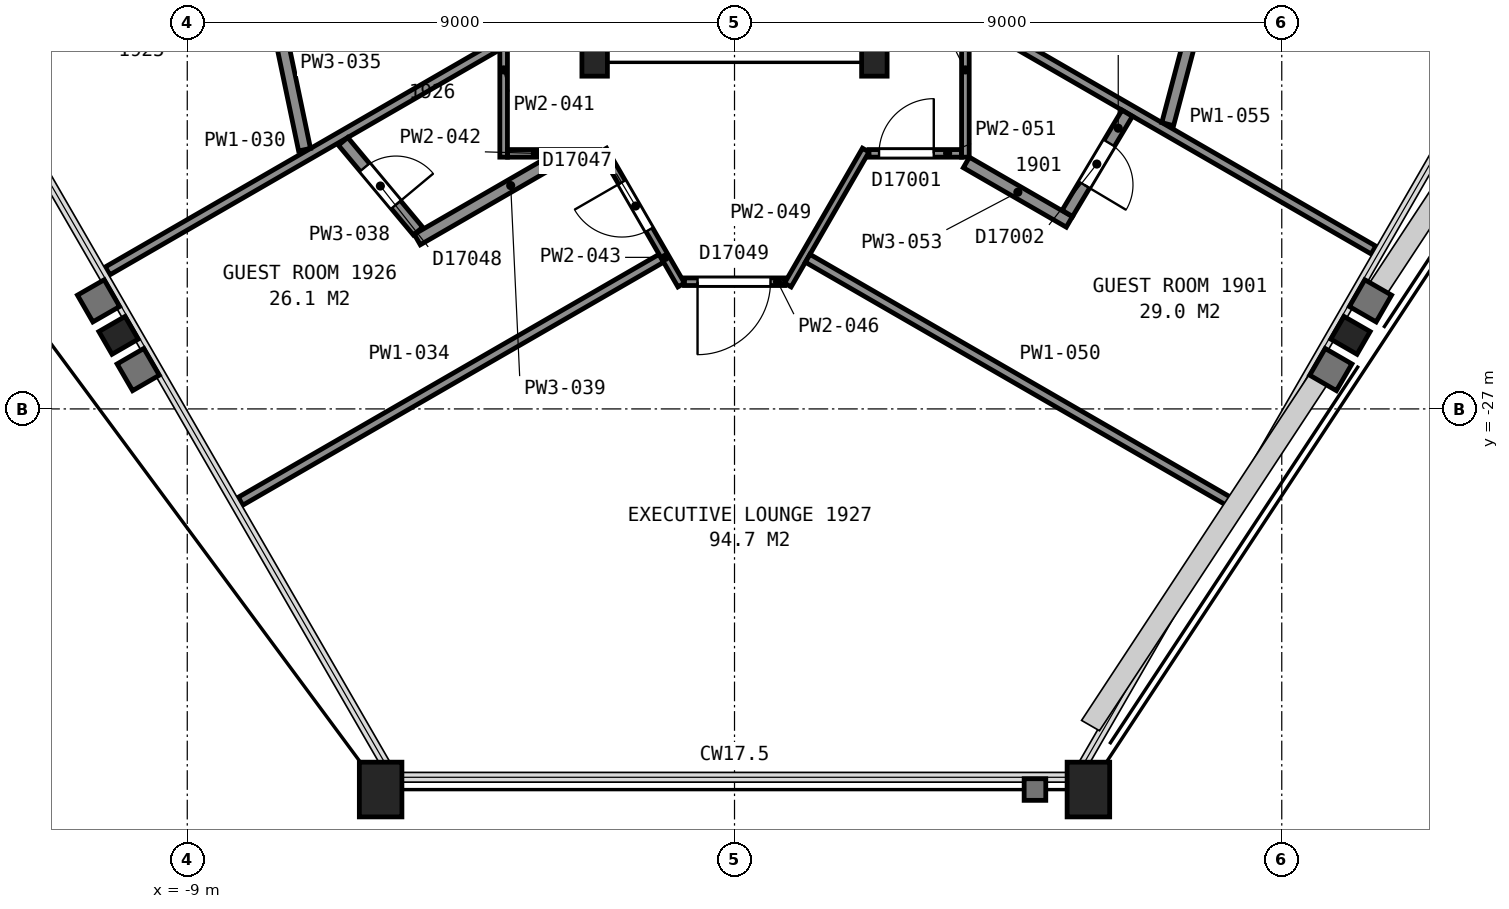
"""IFC4 building model, lengths in metres.
Left out: names, types, materials, properties, quantities, classifications, styles, units other than length and angle.
Written with IfcOpenShell. Run it as: python <this file> out.ifc"""

import sys

from ifc_helpers import new_model, si_unit, direction, frame, frame_2d, origin, origin_2d, place, context, subcontext, project, spatial, rectangle, hollow_rectangle, i_section, extrude, element, fill, save


model = new_model("IFC4")
c1 = context("Model", 3, precision=1e-05, world=origin(), true_north=direction((0.0, 1.0)))
c2 = subcontext(c1, "Body", "Model", "MODEL_VIEW")
j1 = project(units=[si_unit("LENGTHUNIT", "METRE"), si_unit("PLANEANGLEUNIT", "RADIAN")], contexts=[c1])
p1 = place(None, origin())
s1 = spatial("IfcSite", under=j1, at=p1, CompositionType="ELEMENT")
p2 = place(p1, origin())
s2 = spatial("IfcBuilding", under=s1, at=p2, CompositionType="ELEMENT")
p3 = place(p2, frame((0.0, 0.0, 83.6)))
s3 = spatial("IfcBuildingStorey", under=s2, at=p3, CompositionType="ELEMENT", Elevation=83.6)
p4 = place(p3, frame((-10.13, -25.79, 0.0), z_axis=(0.0, 0.0, 1.0), x_axis=(-0.5, 0.866025403784, 0.0)))
e1 = element("IfcColumn", 1, at=p4, inside=s3, PredefinedType="COLUMN", context=c2, shape_type="SweptSolid", body=[
    extrude(i_section(OverallWidth=0.432, OverallDepth=0.498, WebThickness=0.056, FlangeThickness=0.089, FilletRadius=0.015, at=origin_2d()), origin(), (0.0, 0.0, 1.0), 2.87),
])
for number, where, z_axis, x_axis in (
    (2, (-5.82, -33.26, 0.0), (0.0, 0.0, 1.0), (-1.0, 0.0, 0.0)),
    (3, (5.82, -33.26, 0.0), (0.0, 0.0, 1.0), (-1.0, 0.0, 0.0)),
):
    element("IfcColumn", number, at=place(p3, frame(where, z_axis=z_axis, x_axis=x_axis)), inside=s3, PredefinedType="COLUMN", context=c2, shape_type="SweptSolid", body=[
        extrude(hollow_rectangle(XDim=0.7, YDim=0.9, WallThickness=0.065, at=origin_2d()), origin(), (0.0, 0.0, 1.0), 3.6),
    ])
p5 = place(p3, frame((10.13, -25.79, 0.0), z_axis=(0.0, 0.0, 1.0), x_axis=(-0.5, -0.866025403784, 0.0)))
e4 = element("IfcColumn", 4, at=p5, inside=s3, PredefinedType="COLUMN", context=c2, shape_type="SweptSolid", body=[
    extrude(i_section(OverallWidth=0.432, OverallDepth=0.498, WebThickness=0.056, FlangeThickness=0.089, FilletRadius=0.015, at=origin_2d()), origin(), (0.0, 0.0, 1.0), 2.87),
])
for number, where, z_axis, x_axis in (
    (5, (-2.3, -21.3, 0.0), (0.0, 0.0, 1.0), (-1.0, 0.0, 0.0)),
    (6, (2.3, -21.3, 0.0), (0.0, 0.0, 1.0), (-1.0, 0.0, 0.0)),
):
    element("IfcColumn", number, at=place(p3, frame(where, z_axis=z_axis, x_axis=x_axis)), inside=s3, PredefinedType="COLUMN", context=c2, shape_type="SweptSolid", body=[
        extrude(i_section(OverallWidth=0.419, OverallDepth=0.455, WebThickness=0.042, FlangeThickness=0.068, FilletRadius=0.015, at=origin_2d()), origin(), (0.0, 0.0, 1.0), 3.6),
    ])
p6 = place(p3, frame((-10.311, -24.73, 0.0), z_axis=(0.0, 0.0, 1.0), x_axis=(0.8660132178, 0.500021106151, 0.0)))
e7 = element("IfcWall", 7, at=p6, inside=s3, PredefinedType="PARTITIONING", context=c2, shape_type="SweptSolid", body=[
    extrude(rectangle(XDim=7.406, YDim=0.15, at=frame_2d((3.703, 0.0))), origin(), (0.0, 0.0, 1.0), 2.262),
])
p7 = place(p3, frame((-8.124, -28.518, 0.0), z_axis=(0.0, 0.0, 1.0), x_axis=(0.866021771655, 0.500006290979, 0.0)))
e8 = element("IfcWall", 8, at=p7, inside=s3, PredefinedType="PARTITIONING", context=c2, shape_type="SweptSolid", body=[
    extrude(rectangle(XDim=7.992, YDim=0.15, at=frame_2d((3.996, 0.0))), origin(), (0.0, 0.0, 1.0), 2.262),
])
p8 = place(p3, frame((-7.668, -19.877, 0.0), z_axis=(0.0, 0.0, 1.0), x_axis=(0.204611748063, -0.978843211426, 0.0)))
e9 = element("IfcWall", 9, at=p8, inside=s3, PredefinedType="PARTITIONING", context=c2, shape_type="SweptSolid", body=[
    extrude(rectangle(XDim=2.921, YDim=0.2, at=frame_2d((1.46, 0.0))), origin(), (0.0, 0.0, 1.0), 2.262),
])
p9 = place(p3, frame((-6.437, -22.6, 0.0), z_axis=(0.0, 0.0, 1.0), x_axis=(0.640970893908, -0.76756518496, 0.0)))
e10 = element("IfcWall", 10, at=p9, inside=s3, PredefinedType="PARTITIONING", context=c2, shape_type="SweptSolid", body=[
    extrude(rectangle(XDim=1.923, YDim=0.2, at=frame_2d((0.961, 0.0))), origin(), (0.0, 0.0, 1.0), 2.262),
])
p10 = place(p9, frame((0.556, 0.0, 0.0)))
e11 = element("IfcOpeningElement", 11, at=p10, cuts=e10, PredefinedType="OPENING", context=c2, shape_type="SweptSolid", body=[
    extrude(rectangle(XDim=0.8, YDim=2.1, at=frame_2d((0.4, 1.05))), frame((0.0, 0.11, 0.0), z_axis=(0.0, -1.0, 0.0), x_axis=(1.0, 0.0, 0.0)), (0.0, 0.0, 1.0), 0.22),
])
p11 = place(p3, frame((-5.218, -24.214, 0.0), z_axis=(0.0, 0.0, 1.0), x_axis=(0.865922540442, 0.500178122226, 0.0)))
e12 = element("IfcWall", 12, at=p11, inside=s3, PredefinedType="PARTITIONING", context=c2, shape_type="SweptSolid", body=[
    extrude(rectangle(XDim=2.535, YDim=0.2, at=frame_2d((1.268, 0.0))), origin(), (0.0, 0.0, 1.0), 2.262),
])
p12 = place(p3, frame((-3.797, -22.86, 0.0), z_axis=(0.0, 0.0, 1.0), x_axis=(0.0, 1.0, 0.0)))
e13 = element("IfcWall", 13, at=p12, inside=s3, PredefinedType="PARTITIONING", context=c2, shape_type="SweptSolid", body=[
    extrude(rectangle(XDim=2.871, YDim=0.125, at=frame_2d((1.435, 0.0))), origin(), (0.0, 0.0, 1.0), 2.262),
])
p13 = place(p3, frame((-3.732, -22.797, 0.0), z_axis=(0.0, 0.0, 1.0), x_axis=(1.0, 0.0, 0.0)))
e14 = element("IfcWall", 14, at=p13, inside=s3, PredefinedType="PARTITIONING", context=c2, shape_type="SweptSolid", body=[
    extrude(rectangle(XDim=1.52, YDim=0.125, at=frame_2d((0.76, 0.0))), origin(), (0.0, 0.0, 1.0), 2.262),
])
p14 = place(p3, frame((-0.877, -24.962, 0.0), z_axis=(0.0, 0.0, 1.0), x_axis=(-0.500063308241, 0.865988849669, 0.0)))
e15 = element("IfcWall", 15, at=p14, inside=s3, PredefinedType="PARTITIONING", context=c2, shape_type="SweptSolid", body=[
    extrude(rectangle(XDim=2.563, YDim=0.125, at=frame_2d((1.281, 0.0))), origin(), (0.0, 0.0, 1.0), 2.262),
])
p15 = place(p14, frame((1.05, 0.0, 0.0)))
e16 = element("IfcOpeningElement", 16, at=p15, cuts=e15, PredefinedType="OPENING", context=c2, shape_type="SweptSolid", body=[
    extrude(rectangle(XDim=0.9, YDim=2.1, at=frame_2d((0.45, 1.05))), frame((0.0, 0.073, 0.0), z_axis=(0.0, -1.0, 0.0), x_axis=(1.0, 0.0, 0.0)), (0.0, 0.0, 1.0), 0.145),
])
p16 = place(p3, frame((0.823, -24.908, 0.0), z_axis=(0.0, 0.0, 1.0), x_axis=(-1.0, 0.0, 0.0)))
e17 = element("IfcWall", 17, at=p16, inside=s3, PredefinedType="PARTITIONING", context=c2, shape_type="SweptSolid", body=[
    extrude(rectangle(XDim=1.646, YDim=0.125, at=frame_2d((0.823, 0.0))), origin(), (0.0, 0.0, 1.0), 2.262),
])
p17 = place(p16, frame((0.231, 0.0, 0.0)))
e18 = element("IfcOpeningElement", 18, at=p17, cuts=e17, PredefinedType="OPENING", context=c2, shape_type="SweptSolid", body=[
    extrude(rectangle(XDim=1.2, YDim=2.1, at=frame_2d((0.6, 1.05))), frame((0.0, 0.073, 0.0), z_axis=(0.0, -1.0, 0.0), x_axis=(1.0, 0.0, 0.0)), (0.0, 0.0, 1.0), 0.145),
])
p18 = place(p3, frame((0.877, -24.962, 0.0), z_axis=(0.0, 0.0, 1.0), x_axis=(0.500063308241, 0.865988849669, 0.0)))
e19 = element("IfcWall", 19, at=p18, inside=s3, PredefinedType="PARTITIONING", context=c2, shape_type="SweptSolid", body=[
    extrude(rectangle(XDim=2.563, YDim=0.125, at=frame_2d((1.281, 0.0))), origin(), (0.0, 0.0, 1.0), 2.262),
])
p19 = place(p3, frame((1.203, -24.522, 0.0), z_axis=(0.0, 0.0, 1.0), x_axis=(0.866021771655, -0.500006290979, 0.0)))
e20 = element("IfcWall", 20, at=p19, inside=s3, PredefinedType="PARTITIONING", context=c2, shape_type="SweptSolid", body=[
    extrude(rectangle(XDim=7.992, YDim=0.15, at=frame_2d((3.996, 0.0))), origin(), (0.0, 0.0, 1.0), 2.262),
])
p20 = place(p3, frame((3.732, -22.797, 0.0), z_axis=(0.0, 0.0, 1.0), x_axis=(-1.0, 0.0, 0.0)))
e21 = element("IfcWall", 21, at=p20, inside=s3, PredefinedType="PARTITIONING", context=c2, shape_type="SweptSolid", body=[
    extrude(rectangle(XDim=1.52, YDim=0.125, at=frame_2d((0.76, 0.0))), origin(), (0.0, 0.0, 1.0), 2.262),
])
p21 = place(p20, frame((0.455, 0.0, 0.0)))
e22 = element("IfcOpeningElement", 22, at=p21, cuts=e21, PredefinedType="OPENING", context=c2, shape_type="SweptSolid", body=[
    extrude(rectangle(XDim=0.9, YDim=2.1, at=frame_2d((0.45, 1.05))), frame((0.0, 0.073, 0.0), z_axis=(0.0, -1.0, 0.0), x_axis=(1.0, 0.0, 0.0)), (0.0, 0.0, 1.0), 0.145),
])
p22 = place(p3, frame((3.813, -22.946, 0.0), z_axis=(0.0, 0.0, 1.0), x_axis=(0.865944380701, -0.500140309845, 0.0)))
e23 = element("IfcWall", 23, at=p22, inside=s3, PredefinedType="PARTITIONING", context=c2, shape_type="SweptSolid", body=[
    extrude(rectangle(XDim=1.956, YDim=0.2, at=frame_2d((0.978, 0.0))), origin(), (0.0, 0.0, 1.0), 2.262),
])
p23 = place(p3, frame((3.797, -22.86, 0.0), z_axis=(0.0, 0.0, 1.0), x_axis=(0.0, 1.0, 0.0)))
e24 = element("IfcWall", 24, at=p23, inside=s3, PredefinedType="PARTITIONING", context=c2, shape_type="SweptSolid", body=[
    extrude(rectangle(XDim=2.871, YDim=0.125, at=frame_2d((1.435, 0.0))), origin(), (0.0, 0.0, 1.0), 2.262),
])
p24 = place(p3, frame((3.897, -20.57, 0.0), z_axis=(0.0, 0.0, 1.0), x_axis=(0.866030628547, -0.499990950336, 0.0)))
e25 = element("IfcWall", 25, at=p24, inside=s3, PredefinedType="PARTITIONING", context=c2, shape_type="SweptSolid", body=[
    extrude(rectangle(XDim=7.635, YDim=0.15, at=frame_2d((3.817, 0.0))), origin(), (0.0, 0.0, 1.0), 2.262),
])
p25 = place(p3, frame((5.474, -23.784, 0.0), z_axis=(0.0, 0.0, 1.0), x_axis=(0.512791921509, 0.858512926656, 0.0)))
e26 = element("IfcWall", 26, at=p25, inside=s3, PredefinedType="PARTITIONING", context=c2, shape_type="SweptSolid", body=[
    extrude(rectangle(XDim=1.919, YDim=0.2, at=frame_2d((0.959, 0.0))), origin(), (0.0, 0.0, 1.0), 2.262),
])
p26 = place(p25, frame((0.545, 0.0, 0.0)))
e27 = element("IfcOpeningElement", 27, at=p26, cuts=e26, PredefinedType="OPENING", context=c2, shape_type="SweptSolid", body=[
    extrude(rectangle(XDim=0.8, YDim=2.1, at=frame_2d((0.4, 1.05))), frame((0.0, 0.11, 0.0), z_axis=(0.0, -1.0, 0.0), x_axis=(1.0, 0.0, 0.0)), (0.0, 0.0, 1.0), 0.22),
])
p27 = place(p3, frame((7.124, -22.317, 0.0), z_axis=(0.0, 0.0, 1.0), x_axis=(0.255720101769, 0.966750862193, 0.0)))
e28 = element("IfcWall", 28, at=p27, inside=s3, PredefinedType="PARTITIONING", context=c2, shape_type="SweptSolid", body=[
    extrude(rectangle(XDim=2.879, YDim=0.2, at=frame_2d((1.44, 0.0))), origin(), (0.0, 0.0, 1.0), 2.262),
])
p28 = place(p10, origin())
e29 = element("IfcDoor", 29, at=p28, inside=s3, OperationType="SINGLE_SWING_RIGHT", PredefinedType="DOOR", context=c2, shape_type="SweptSolid", body=[
    extrude(rectangle(XDim=0.8, YDim=2.1, at=frame_2d((0.4, 1.05))), frame((0.0, 0.025, 0.0), z_axis=(0.0, -1.0, 0.0), x_axis=(1.0, 0.0, 0.0)), (0.0, 0.0, 1.0), 0.05),
])
fill(e11, e29)
p29 = place(p15, origin())
e30 = element("IfcDoor", 30, at=p29, inside=s3, OperationType="SINGLE_SWING_RIGHT", PredefinedType="DOOR", context=c2, shape_type="SweptSolid", body=[
    extrude(rectangle(XDim=0.9, YDim=2.1, at=frame_2d((0.45, 1.05))), frame((0.0, 0.025, 0.0), z_axis=(0.0, -1.0, 0.0), x_axis=(1.0, 0.0, 0.0)), (0.0, 0.0, 1.0), 0.05),
])
fill(e16, e30)
p30 = place(p17, origin())
e31 = element("IfcDoor", 31, at=p30, inside=s3, OperationType="SINGLE_SWING_RIGHT", PredefinedType="DOOR", context=c2, shape_type="SweptSolid", body=[
    extrude(rectangle(XDim=1.2, YDim=2.1, at=frame_2d((0.6, 1.05))), frame((0.0, 0.025, 0.0), z_axis=(0.0, -1.0, 0.0), x_axis=(1.0, 0.0, 0.0)), (0.0, 0.0, 1.0), 0.05),
])
fill(e18, e31)
p31 = place(p21, origin())
e32 = element("IfcDoor", 32, at=p31, inside=s3, OperationType="SINGLE_SWING_LEFT", PredefinedType="DOOR", context=c2, shape_type="SweptSolid", body=[
    extrude(rectangle(XDim=0.9, YDim=2.1, at=frame_2d((0.45, 1.05))), frame((0.0, 0.025, 0.0), z_axis=(0.0, -1.0, 0.0), x_axis=(1.0, 0.0, 0.0)), (0.0, 0.0, 1.0), 0.05),
])
fill(e22, e32)
p32 = place(p26, origin())
e33 = element("IfcDoor", 33, at=p32, inside=s3, OperationType="SINGLE_SWING_LEFT", PredefinedType="DOOR", context=c2, shape_type="SweptSolid", body=[
    extrude(rectangle(XDim=0.8, YDim=2.1, at=frame_2d((0.4, 1.05))), frame((0.0, 0.025, 0.0), z_axis=(0.0, -1.0, 0.0), x_axis=(1.0, 0.0, 0.0)), (0.0, 0.0, 1.0), 0.05),
])
fill(e27, e33)
save(model, sys.argv[1])
